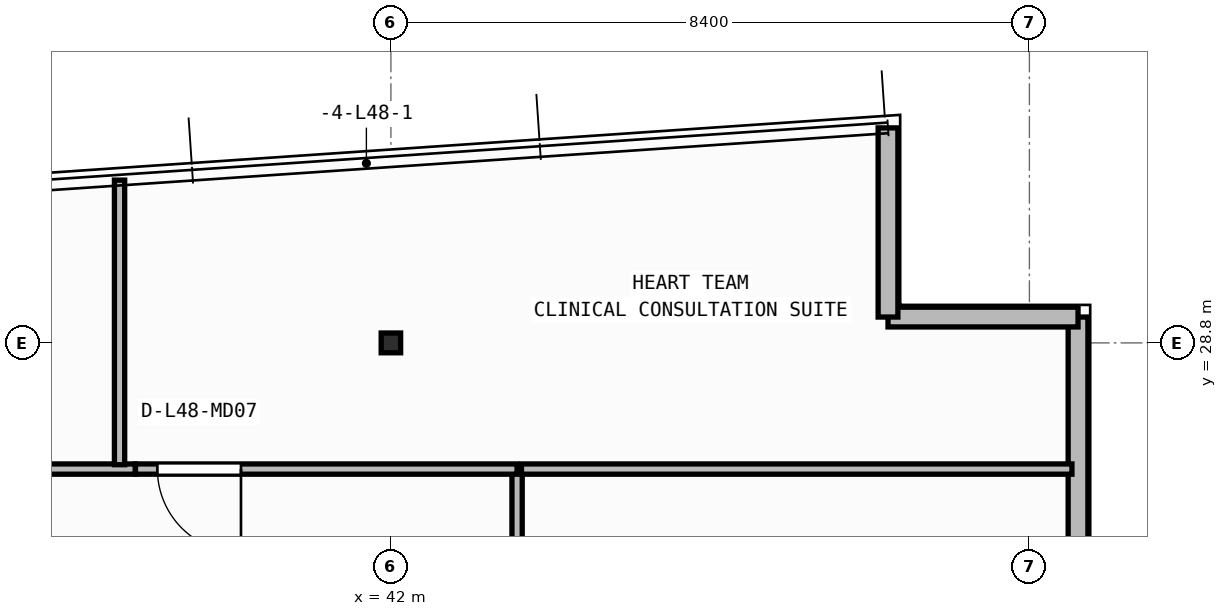
"""IFC4 building model, lengths in metres.
Left out: names, types, materials, properties, quantities, classifications, styles, units other than length and angle.
Written with IfcOpenShell. Run it as: python <this file> out.ifc"""

import sys

from ifc_helpers import new_model, si_unit, direction, frame, frame_2d, origin, origin_2d, place, context, subcontext, project, spatial, rectangle, i_section, extrude, element, fill, save


model = new_model("IFC4")
c1 = context("Model", 3, precision=1e-05, world=origin(), true_north=direction((0.0, 1.0)))
c2 = subcontext(c1, "Body", "Model", "MODEL_VIEW")
j1 = project(units=[si_unit("LENGTHUNIT", "METRE"), si_unit("PLANEANGLEUNIT", "RADIAN")], contexts=[c1])
p1 = place(None, origin())
s1 = spatial("IfcSite", under=j1, at=p1, CompositionType="ELEMENT")
p2 = place(p1, origin())
s2 = spatial("IfcBuilding", under=s1, at=p2, CompositionType="ELEMENT")
p3 = place(p2, frame((0.0, 0.0, 196.05)))
s3 = spatial("IfcBuildingStorey", under=s2, at=p3, CompositionType="ELEMENT", Elevation=196.05)
p4 = place(p3, frame((42.0, 28.8, 0.0), z_axis=(0.0, 0.0, 1.0), x_axis=(1.0, 0.0, 0.0)))
e1 = element("IfcColumn", 1, at=p4, inside=s3, PredefinedType="COLUMN", context=c2, shape_type="SweptSolid", body=[
    extrude(i_section(OverallWidth=0.256, OverallDepth=0.26, WebThickness=0.01, FlangeThickness=0.017, FilletRadius=0.013, at=origin_2d()), origin(), (0.0, 0.0, 1.0), 3.95),
])
p5 = place(p3, frame((51.04, 6.46, 0.0), z_axis=(0.0, 0.0, 1.0), x_axis=(0.0, 1.0, 0.0)))
e2 = element("IfcWall", 2, at=p5, inside=s3, PredefinedType="STANDARD", context=c2, shape_type="SweptSolid", body=[
    extrude(rectangle(XDim=22.68, YDim=0.26, at=frame_2d((11.34, 0.0))), origin(), (0.0, 0.0, 1.0), 3.71),
])
p6 = place(p5, frame((10.69, 0.0, 0.0)))
e3 = element("IfcOpeningElement", 3, at=p6, cuts=e2, PredefinedType="OPENING", context=c2, shape_type="SweptSolid", body=[
    extrude(rectangle(XDim=1.3, YDim=2.15, at=frame_2d((0.65, 1.075))), frame((0.0, 0.14, 0.0), z_axis=(0.0, -1.0, 0.0), x_axis=(1.0, 0.0, 0.0)), (0.0, 0.0, 1.0), 0.28),
])
p7 = place(p3, frame((51.04, 29.14, 0.0), z_axis=(0.0, 0.0, 1.0), x_axis=(-1.0, 0.0, 0.0)))
e4 = element("IfcWall", 4, at=p7, inside=s3, PredefinedType="STANDARD", context=c2, shape_type="SweptSolid", body=[
    extrude(rectangle(XDim=2.5, YDim=0.26, at=frame_2d((1.25, 0.0))), origin(), (0.0, 0.0, 1.0), 3.71),
])
p8 = place(p3, frame((48.54, 29.14, 0.0), z_axis=(0.0, 0.0, 1.0), x_axis=(0.0, 1.0, 0.0)))
e5 = element("IfcWall", 5, at=p8, inside=s3, PredefinedType="STANDARD", context=c2, shape_type="SweptSolid", body=[
    extrude(rectangle(XDim=2.489, YDim=0.26, at=frame_2d((1.245, 0.0))), origin(), (0.0, 0.0, 1.0), 3.71),
])
p9 = place(p3, frame((43.66, 20.498, 0.0), z_axis=(0.0, 0.0, 1.0), x_axis=(0.0, 1.0, 0.0)))
e6 = element("IfcWall", 6, at=p9, inside=s3, PredefinedType="PARTITIONING", context=c2, shape_type="SweptSolid", body=[
    extrude(rectangle(XDim=6.642, YDim=0.135, at=frame_2d((3.321, 0.0))), origin(), (0.0, 0.0, 1.0), 3.71),
])
p10 = place(p9, frame((3.542, 0.0, 0.0)))
e7 = element("IfcOpeningElement", 7, at=p10, cuts=e6, PredefinedType="OPENING", context=c2, shape_type="SweptSolid", body=[
    extrude(rectangle(XDim=1.1, YDim=2.1, at=frame_2d((0.55, 1.05))), frame((0.0, 0.077, 0.0), z_axis=(0.0, -1.0, 0.0), x_axis=(1.0, 0.0, 0.0)), (0.0, 0.0, 1.0), 0.155),
])
p11 = place(p3, frame((38.637, 27.14, 0.0), z_axis=(0.0, 0.0, 1.0), x_axis=(-1.0, 0.0, 0.0)))
e8 = element("IfcWall", 8, at=p11, inside=s3, PredefinedType="PARTITIONING", context=c2, shape_type="SweptSolid", body=[
    extrude(rectangle(XDim=2.38, YDim=0.135, at=frame_2d((1.19, 0.0))), origin(), (0.0, 0.0, 1.0), 3.71),
])
p12 = place(p3, frame((43.66, 27.14, 0.0), z_axis=(0.0, 0.0, 1.0), x_axis=(-1.0, 0.0, 0.0)))
e9 = element("IfcWall", 9, at=p12, inside=s3, PredefinedType="PARTITIONING", context=c2, shape_type="SweptSolid", body=[
    extrude(rectangle(XDim=5.021, YDim=0.135, at=frame_2d((2.51, 0.0))), origin(), (0.0, 0.0, 1.0), 3.71),
])
p13 = place(p12, frame((3.633, 0.0, 0.0)))
e10 = element("IfcOpeningElement", 10, at=p13, cuts=e9, PredefinedType="OPENING", context=c2, shape_type="SweptSolid", body=[
    extrude(rectangle(XDim=1.1, YDim=2.1, at=frame_2d((0.55, 1.05))), frame((0.0, 0.077, 0.0), z_axis=(0.0, -1.0, 0.0), x_axis=(1.0, 0.0, 0.0)), (0.0, 0.0, 1.0), 0.155),
])
p14 = place(p3, frame((50.96, 27.14, 0.0), z_axis=(0.0, 0.0, 1.0), x_axis=(-1.0, 0.0, 0.0)))
e11 = element("IfcWall", 11, at=p14, inside=s3, PredefinedType="PARTITIONING", context=c2, shape_type="SweptSolid", body=[
    extrude(rectangle(XDim=7.242, YDim=0.135, at=frame_2d((3.621, 0.0))), origin(), (0.0, 0.0, 1.0), 3.71),
])
p15 = place(p3, frame((38.43, 27.198, 0.0), z_axis=(0.0, 0.0, 1.0), x_axis=(0.0, 1.0, 0.0)))
e12 = element("IfcWall", 12, at=p15, inside=s3, PredefinedType="PARTITIONING", context=c2, shape_type="SweptSolid", body=[
    extrude(rectangle(XDim=3.744, YDim=0.135, at=frame_2d((1.872, 0.0))), origin(), (0.0, 0.0, 1.0), 3.71),
])
p16 = place(p13, origin())
e13 = element("IfcDoor", 13, at=p16, inside=s3, OperationType="SINGLE_SWING_LEFT", PredefinedType="DOOR", context=c2, shape_type="SweptSolid", body=[
    extrude(rectangle(XDim=1.1, YDim=2.1, at=frame_2d((0.55, 1.05))), frame((0.0, 0.025, 0.0), z_axis=(0.0, -1.0, 0.0), x_axis=(1.0, 0.0, 0.0)), (0.0, 0.0, 1.0), 0.05),
])
fill(e10, e13)
save(model, sys.argv[1])
